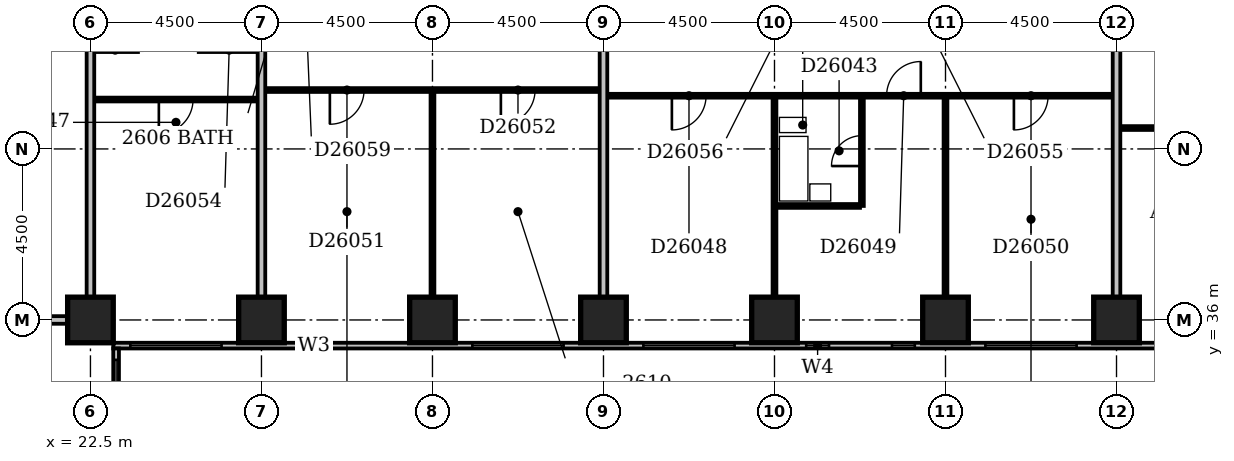
"""IFC4 building model, lengths in metres.
Left out: names, types, materials, properties, quantities, classifications, styles, units other than length and angle.
Written with IfcOpenShell. Run it as: python <this file> out.ifc"""

import sys

from ifc_helpers import new_model, si_unit, direction, frame, frame_2d, origin, origin_2d, place, context, subcontext, project, spatial, rectangle, extrude, element, fill, save


model = new_model("IFC4")
c1 = context("Model", 3, precision=1e-05, world=origin(), true_north=direction((0.0, 1.0)))
c2 = subcontext(c1, "Body", "Model", "MODEL_VIEW")
j1 = project(units=[si_unit("LENGTHUNIT", "METRE"), si_unit("PLANEANGLEUNIT", "RADIAN")], contexts=[c1])
p1 = place(None, origin())
s1 = spatial("IfcSite", under=j1, at=p1, CompositionType="ELEMENT")
p2 = place(p1, origin())
s2 = spatial("IfcBuilding", under=s1, at=p2, CompositionType="ELEMENT")
p3 = place(p2, frame((0.0, 0.0, 104.6)))
s3 = spatial("IfcBuildingStorey", under=s2, at=p3, CompositionType="ELEMENT", Elevation=104.6)
for number, where, z_axis, x_axis in (
    (1, (22.5, 36.0, -0.3), (0.0, 0.0, 1.0), (1.0, 0.0, 0.0)),
    (2, (27.0, 36.0, -0.3), (0.0, 0.0, 1.0), (1.0, 0.0, 0.0)),
    (3, (31.5, 36.0, -0.3), (0.0, 0.0, 1.0), (1.0, 0.0, 0.0)),
    (4, (36.0, 36.0, -0.3), (0.0, 0.0, 1.0), (1.0, 0.0, 0.0)),
    (5, (40.5, 36.0, -0.3), (0.0, 0.0, 1.0), (1.0, 0.0, 0.0)),
    (6, (45.0, 36.0, -0.3), (0.0, 0.0, 1.0), (1.0, 0.0, 0.0)),
    (7, (49.5, 36.0, -0.3), (0.0, 0.0, 1.0), (1.0, 0.0, 0.0)),
):
    element("IfcColumn", number, at=place(p3, frame(where, z_axis=z_axis, x_axis=x_axis)), inside=s3, PredefinedType="COLUMN", context=c2, shape_type="SweptSolid", body=[
        extrude(rectangle(XDim=1.2, YDim=1.2, at=origin_2d()), origin(), (0.0, 0.0, 1.0), 3.45),
    ])
p4 = place(p3, frame((23.175, 17.4, 0.0), z_axis=(0.0, 0.0, 1.0), x_axis=(0.0, 1.0, 0.0)))
e8 = element("IfcWall", 8, at=p4, inside=s3, PredefinedType="STANDARD", context=c2, shape_type="SweptSolid", body=[
    extrude(rectangle(XDim=17.85, YDim=0.15, at=frame_2d((8.925, 0.0))), origin(), (0.0, 0.0, 1.0), 2.5),
])
p5 = place(p4, frame((1.65, 0.0, 0.6)))
e9 = element("IfcOpeningElement", 9, at=p5, cuts=e8, PredefinedType="OPENING", context=c2, shape_type="SweptSolid", body=[
    extrude(rectangle(XDim=2.4, YDim=1.8, at=frame_2d((1.2, 0.9))), frame((0.0, 0.087, 0.0), z_axis=(0.0, -1.0, 0.0), x_axis=(1.0, 0.0, 0.0)), (0.0, 0.0, 1.0), 0.174),
])
p6 = place(p4, frame((5.958, 0.0, 0.6)))
e10 = element("IfcOpeningElement", 10, at=p6, cuts=e8, PredefinedType="OPENING", context=c2, shape_type="SweptSolid", body=[
    extrude(rectangle(XDim=2.1, YDim=1.8, at=frame_2d((1.05, 0.9))), frame((0.0, 0.087, 0.0), z_axis=(0.0, -1.0, 0.0), x_axis=(1.0, 0.0, 0.0)), (0.0, 0.0, 1.0), 0.174),
])
p7 = place(p4, frame((10.65, 0.0, 0.6)))
e11 = element("IfcOpeningElement", 11, at=p7, cuts=e8, PredefinedType="OPENING", context=c2, shape_type="SweptSolid", body=[
    extrude(rectangle(XDim=2.4, YDim=1.8, at=frame_2d((1.2, 0.9))), frame((0.0, 0.087, 0.0), z_axis=(0.0, -1.0, 0.0), x_axis=(1.0, 0.0, 0.0)), (0.0, 0.0, 1.0), 0.174),
])
p8 = place(p4, frame((15.15, 0.0, 0.6)))
e12 = element("IfcOpeningElement", 12, at=p8, cuts=e8, PredefinedType="OPENING", context=c2, shape_type="SweptSolid", body=[
    extrude(rectangle(XDim=2.4, YDim=1.8, at=frame_2d((1.2, 0.9))), frame((0.0, 0.087, 0.0), z_axis=(0.0, -1.0, 0.0), x_axis=(1.0, 0.0, 0.0)), (0.0, 0.0, 1.0), 0.174),
])
p9 = place(p3, frame((23.1, 35.325, 0.0), z_axis=(0.0, 0.0, 1.0), x_axis=(1.0, 0.0, 0.0)))
e13 = element("IfcWall", 13, at=p9, inside=s3, PredefinedType="STANDARD", context=c2, shape_type="SweptSolid", body=[
    extrude(rectangle(XDim=45.15, YDim=0.15, at=frame_2d((22.575, 0.0))), origin(), (0.0, 0.0, 1.0), 2.5),
])
p10 = place(p9, frame((0.45, 0.0, 0.6)))
e14 = element("IfcOpeningElement", 14, at=p10, cuts=e13, PredefinedType="OPENING", context=c2, shape_type="SweptSolid", body=[
    extrude(rectangle(XDim=2.4, YDim=1.8, at=frame_2d((1.2, 0.9))), frame((0.0, 0.087, 0.0), z_axis=(0.0, -1.0, 0.0), x_axis=(1.0, 0.0, 0.0)), (0.0, 0.0, 1.0), 0.174),
])
p11 = place(p9, frame((4.831, 0.0, 0.6)))
e15 = element("IfcOpeningElement", 15, at=p11, cuts=e13, PredefinedType="OPENING", context=c2, shape_type="SweptSolid", body=[
    extrude(rectangle(XDim=0.9, YDim=1.8, at=frame_2d((0.45, 0.9))), frame((0.0, 0.087, 0.0), z_axis=(0.0, -1.0, 0.0), x_axis=(1.0, 0.0, 0.0)), (0.0, 0.0, 1.0), 0.174),
])
p12 = place(p9, frame((9.45, 0.0, 0.6)))
e16 = element("IfcOpeningElement", 16, at=p12, cuts=e13, PredefinedType="OPENING", context=c2, shape_type="SweptSolid", body=[
    extrude(rectangle(XDim=2.4, YDim=1.8, at=frame_2d((1.2, 0.9))), frame((0.0, 0.087, 0.0), z_axis=(0.0, -1.0, 0.0), x_axis=(1.0, 0.0, 0.0)), (0.0, 0.0, 1.0), 0.174),
])
p13 = place(p9, frame((13.95, 0.0, 0.6)))
e17 = element("IfcOpeningElement", 17, at=p13, cuts=e13, PredefinedType="OPENING", context=c2, shape_type="SweptSolid", body=[
    extrude(rectangle(XDim=2.4, YDim=1.8, at=frame_2d((1.2, 0.9))), frame((0.0, 0.087, 0.0), z_axis=(0.0, -1.0, 0.0), x_axis=(1.0, 0.0, 0.0)), (0.0, 0.0, 1.0), 0.174),
])
p14 = place(p9, frame((18.234, 0.0, 0.6)))
e18 = element("IfcOpeningElement", 18, at=p14, cuts=e13, PredefinedType="OPENING", context=c2, shape_type="SweptSolid", body=[
    extrude(rectangle(XDim=0.6, YDim=1.8, at=frame_2d((0.3, 0.9))), frame((0.0, 0.087, 0.0), z_axis=(0.0, -1.0, 0.0), x_axis=(1.0, 0.0, 0.0)), (0.0, 0.0, 1.0), 0.174),
])
p15 = place(p9, frame((20.492, 0.0, 0.6)))
e19 = element("IfcOpeningElement", 19, at=p15, cuts=e13, PredefinedType="OPENING", context=c2, shape_type="SweptSolid", body=[
    extrude(rectangle(XDim=0.6, YDim=1.8, at=frame_2d((0.3, 0.9))), frame((0.0, 0.087, 0.0), z_axis=(0.0, -1.0, 0.0), x_axis=(1.0, 0.0, 0.0)), (0.0, 0.0, 1.0), 0.174),
])
p16 = place(p9, frame((22.95, 0.0, 0.6)))
e20 = element("IfcOpeningElement", 20, at=p16, cuts=e13, PredefinedType="OPENING", context=c2, shape_type="SweptSolid", body=[
    extrude(rectangle(XDim=2.4, YDim=1.8, at=frame_2d((1.2, 0.9))), frame((0.0, 0.087, 0.0), z_axis=(0.0, -1.0, 0.0), x_axis=(1.0, 0.0, 0.0)), (0.0, 0.0, 1.0), 0.174),
])
p17 = place(p9, frame((27.45, 0.0, 0.6)))
e21 = element("IfcOpeningElement", 21, at=p17, cuts=e13, PredefinedType="OPENING", context=c2, shape_type="SweptSolid", body=[
    extrude(rectangle(XDim=2.4, YDim=1.8, at=frame_2d((1.2, 0.9))), frame((0.0, 0.087, 0.0), z_axis=(0.0, -1.0, 0.0), x_axis=(1.0, 0.0, 0.0)), (0.0, 0.0, 1.0), 0.174),
])
p18 = place(p9, frame((31.95, 0.0, 0.6)))
e22 = element("IfcOpeningElement", 22, at=p18, cuts=e13, PredefinedType="OPENING", context=c2, shape_type="SweptSolid", body=[
    extrude(rectangle(XDim=2.4, YDim=1.8, at=frame_2d((1.2, 0.9))), frame((0.0, 0.087, 0.0), z_axis=(0.0, -1.0, 0.0), x_axis=(1.0, 0.0, 0.0)), (0.0, 0.0, 1.0), 0.174),
])
p19 = place(p9, frame((36.45, 0.0, 0.6)))
e23 = element("IfcOpeningElement", 23, at=p19, cuts=e13, PredefinedType="OPENING", context=c2, shape_type="SweptSolid", body=[
    extrude(rectangle(XDim=2.4, YDim=1.8, at=frame_2d((1.2, 0.9))), frame((0.0, 0.087, 0.0), z_axis=(0.0, -1.0, 0.0), x_axis=(1.0, 0.0, 0.0)), (0.0, 0.0, 1.0), 0.174),
])
p20 = place(p9, frame((40.95, 0.0, 0.6)))
e24 = element("IfcOpeningElement", 24, at=p20, cuts=e13, PredefinedType="OPENING", context=c2, shape_type="SweptSolid", body=[
    extrude(rectangle(XDim=2.4, YDim=1.8, at=frame_2d((1.2, 0.9))), frame((0.0, 0.087, 0.0), z_axis=(0.0, -1.0, 0.0), x_axis=(1.0, 0.0, 0.0)), (0.0, 0.0, 1.0), 0.174),
])
p21 = place(p3, frame((9.1, 36.0, 0.0), z_axis=(0.0, 0.0, 1.0), x_axis=(1.0, 0.0, 0.0)))
e25 = element("IfcWall", 25, at=p21, inside=s3, PredefinedType="PARTITIONING", context=c2, shape_type="SweptSolid", body=[
    extrude(rectangle(XDim=12.8, YDim=0.2, at=frame_2d((6.4, 0.0))), origin(), (0.0, 0.0, 1.0), 2.25),
])
p22 = place(p3, frame((22.5, 36.6, 0.0), z_axis=(0.0, 0.0, 1.0), x_axis=(0.0, 1.0, 0.0)))
e26 = element("IfcWall", 26, at=p22, inside=s3, PredefinedType="PARTITIONING", context=c2, shape_type="SweptSolid", body=[
    extrude(rectangle(XDim=12.8, YDim=0.2, at=frame_2d((6.4, 0.0))), origin(), (0.0, 0.0, 1.0), 3.15),
])
p23 = place(p3, frame((27.0, 36.6, 0.0), z_axis=(0.0, 0.0, 1.0), x_axis=(0.0, 1.0, 0.0)))
e27 = element("IfcWall", 27, at=p23, inside=s3, PredefinedType="PARTITIONING", context=c2, shape_type="SweptSolid", body=[
    extrude(rectangle(XDim=12.8, YDim=0.2, at=frame_2d((6.4, 0.0))), origin(), (0.0, 0.0, 1.0), 2.45),
])
p24 = place(p3, frame((31.5, 36.6, 0.0), z_axis=(0.0, 0.0, 1.0), x_axis=(0.0, 1.0, 0.0)))
e28 = element("IfcWall", 28, at=p24, inside=s3, PredefinedType="PARTITIONING", context=c2, shape_type="SweptSolid", body=[
    extrude(rectangle(XDim=5.4, YDim=0.1, at=frame_2d((2.7, 0.0))), origin(), (0.0, 0.0, 1.0), 3.15),
])
p25 = place(p3, frame((36.0, 36.6, 0.0), z_axis=(0.0, 0.0, 1.0), x_axis=(0.0, 1.0, 0.0)))
e29 = element("IfcWall", 29, at=p25, inside=s3, PredefinedType="PARTITIONING", context=c2, shape_type="SweptSolid", body=[
    extrude(rectangle(XDim=12.8, YDim=0.2, at=frame_2d((6.4, 0.0))), origin(), (0.0, 0.0, 1.0), 2.25),
])
p26 = place(p3, frame((40.5, 36.6, 0.0), z_axis=(0.0, 0.0, 1.0), x_axis=(0.0, 1.0, 0.0)))
e30 = element("IfcWall", 30, at=p26, inside=s3, PredefinedType="PARTITIONING", context=c2, shape_type="SweptSolid", body=[
    extrude(rectangle(XDim=5.25, YDim=0.1, at=frame_2d((2.625, 0.0))), origin(), (0.0, 0.0, 1.0), 3.15),
])
p27 = place(p3, frame((45.0, 36.6, 0.0), z_axis=(0.0, 0.0, 1.0), x_axis=(0.0, 1.0, 0.0)))
e31 = element("IfcWall", 31, at=p27, inside=s3, PredefinedType="PARTITIONING", context=c2, shape_type="SweptSolid", body=[
    extrude(rectangle(XDim=5.25, YDim=0.1, at=frame_2d((2.625, 0.0))), origin(), (0.0, 0.0, 1.0), 2.45),
])
p28 = place(p3, frame((49.5, 36.6, 0.0), z_axis=(0.0, 0.0, 1.0), x_axis=(0.0, 1.0, 0.0)))
e32 = element("IfcWall", 32, at=p28, inside=s3, PredefinedType="PARTITIONING", context=c2, shape_type="SweptSolid", body=[
    extrude(rectangle(XDim=12.8, YDim=0.2, at=frame_2d((6.4, 0.0))), origin(), (0.0, 0.0, 1.0), 3.15),
])
p29 = place(p3, frame((40.55, 39.0, 0.0), z_axis=(0.0, 0.0, 1.0), x_axis=(1.0, 0.0, 0.0)))
e33 = element("IfcWall", 33, at=p29, inside=s3, PredefinedType="PLUMBINGWALL", context=c2, shape_type="SweptSolid", body=[
    extrude(rectangle(XDim=2.2, YDim=0.1, at=frame_2d((1.1, 0.0))), origin(), (0.0, 0.0, 1.0), 3.15),
])
p30 = place(p3, frame((42.8, 39.0, 0.0), z_axis=(0.0, 0.0, 1.0), x_axis=(0.0, 1.0, 0.0)))
e34 = element("IfcWall", 34, at=p30, inside=s3, PredefinedType="PLUMBINGWALL", context=c2, shape_type="SweptSolid", body=[
    extrude(rectangle(XDim=2.85, YDim=0.1, at=frame_2d((1.425, 0.0))), origin(), (0.0, 0.0, 1.0), 3.15),
])
p31 = place(p30, frame((1.05, 0.0, 0.0)))
e35 = element("IfcOpeningElement", 35, at=p31, cuts=e34, PredefinedType="OPENING", context=c2, shape_type="SweptSolid", body=[
    extrude(rectangle(XDim=0.8, YDim=2.1, at=frame_2d((0.4, 1.05))), frame((0.0, 0.062, 0.0), z_axis=(0.0, -1.0, 0.0), x_axis=(1.0, 0.0, 0.0)), (0.0, 0.0, 1.0), 0.124),
])
p32 = place(p3, frame((49.6, 41.05, 0.0), z_axis=(0.0, 0.0, 1.0), x_axis=(1.0, 0.0, 0.0)))
e36 = element("IfcWall", 36, at=p32, inside=s3, PredefinedType="PARTITIONING", context=c2, shape_type="SweptSolid", body=[
    extrude(rectangle(XDim=17.3, YDim=0.1, at=frame_2d((8.65, 0.0))), origin(), (0.0, 0.0, 1.0), 3.15),
])
p33 = place(p32, frame((3.9, 0.0, 0.0)))
e37 = element("IfcOpeningElement", 37, at=p33, cuts=e36, PredefinedType="OPENING", context=c2, shape_type="SweptSolid", body=[
    extrude(rectangle(XDim=0.9, YDim=2.1, at=frame_2d((0.45, 1.05))), frame((0.0, 0.062, 0.0), z_axis=(0.0, -1.0, 0.0), x_axis=(1.0, 0.0, 0.0)), (0.0, 0.0, 1.0), 0.124),
])
p34 = place(p32, frame((10.7, 0.0, 0.0)))
e38 = element("IfcOpeningElement", 38, at=p34, cuts=e36, PredefinedType="OPENING", context=c2, shape_type="SweptSolid", body=[
    extrude(rectangle(XDim=0.9, YDim=2.1, at=frame_2d((0.45, 1.05))), frame((0.0, 0.062, 0.0), z_axis=(0.0, -1.0, 0.0), x_axis=(1.0, 0.0, 0.0)), (0.0, 0.0, 1.0), 0.124),
])
p35 = place(p32, frame((16.3, 0.0, 0.0)))
e39 = element("IfcOpeningElement", 39, at=p35, cuts=e36, PredefinedType="OPENING", context=c2, shape_type="SweptSolid", body=[
    extrude(rectangle(XDim=0.9, YDim=2.1, at=frame_2d((0.45, 1.05))), frame((0.0, 0.062, 0.0), z_axis=(0.0, -1.0, 0.0), x_axis=(1.0, 0.0, 0.0)), (0.0, 0.0, 1.0), 0.124),
])
p36 = place(p3, frame((22.6, 41.8, 0.0), z_axis=(0.0, 0.0, 1.0), x_axis=(1.0, 0.0, 0.0)))
e40 = element("IfcWall", 40, at=p36, inside=s3, PredefinedType="PARTITIONING", context=c2, shape_type="SweptSolid", body=[
    extrude(rectangle(XDim=4.3, YDim=0.1, at=frame_2d((2.15, 0.0))), origin(), (0.0, 0.0, 1.0), 3.15),
])
p37 = place(p36, frame((1.7, 0.0, 0.0)))
e41 = element("IfcOpeningElement", 41, at=p37, cuts=e40, PredefinedType="OPENING", context=c2, shape_type="SweptSolid", body=[
    extrude(rectangle(XDim=0.9, YDim=2.1, at=frame_2d((0.45, 1.05))), frame((0.0, 0.062, 0.0), z_axis=(0.0, -1.0, 0.0), x_axis=(1.0, 0.0, 0.0)), (0.0, 0.0, 1.0), 0.124),
])
p38 = place(p3, frame((36.1, 41.9, 0.0), z_axis=(0.0, 0.0, 1.0), x_axis=(1.0, 0.0, 0.0)))
e42 = element("IfcWall", 42, at=p38, inside=s3, PredefinedType="PARTITIONING", context=c2, shape_type="SweptSolid", body=[
    extrude(rectangle(XDim=13.3, YDim=0.1, at=frame_2d((6.65, 0.0))), origin(), (0.0, 0.0, 1.0), 3.15),
])
p39 = place(p38, frame((1.7, 0.0, 0.0)))
e43 = element("IfcOpeningElement", 43, at=p39, cuts=e42, PredefinedType="OPENING", context=c2, shape_type="SweptSolid", body=[
    extrude(rectangle(XDim=0.9, YDim=2.1, at=frame_2d((0.45, 1.05))), frame((0.0, 0.062, 0.0), z_axis=(0.0, -1.0, 0.0), x_axis=(1.0, 0.0, 0.0)), (0.0, 0.0, 1.0), 0.124),
])
p40 = place(p38, frame((7.35, 0.0, 0.0)))
e44 = element("IfcOpeningElement", 44, at=p40, cuts=e42, PredefinedType="OPENING", context=c2, shape_type="SweptSolid", body=[
    extrude(rectangle(XDim=0.9, YDim=2.1, at=frame_2d((0.45, 1.05))), frame((0.0, 0.062, 0.0), z_axis=(0.0, -1.0, 0.0), x_axis=(1.0, 0.0, 0.0)), (0.0, 0.0, 1.0), 0.124),
])
p41 = place(p38, frame((10.7, 0.0, 0.0)))
e45 = element("IfcOpeningElement", 45, at=p41, cuts=e42, PredefinedType="OPENING", context=c2, shape_type="SweptSolid", body=[
    extrude(rectangle(XDim=0.9, YDim=2.1, at=frame_2d((0.45, 1.05))), frame((0.0, 0.062, 0.0), z_axis=(0.0, -1.0, 0.0), x_axis=(1.0, 0.0, 0.0)), (0.0, 0.0, 1.0), 0.124),
])
p42 = place(p3, frame((27.1, 42.05, 0.0), z_axis=(0.0, 0.0, 1.0), x_axis=(1.0, 0.0, 0.0)))
e46 = element("IfcWall", 46, at=p42, inside=s3, PredefinedType="PARTITIONING", context=c2, shape_type="SweptSolid", body=[
    extrude(rectangle(XDim=8.8, YDim=0.1, at=frame_2d((4.4, 0.0))), origin(), (0.0, 0.0, 1.0), 3.15),
])
p43 = place(p42, frame((1.7, 0.0, 0.0)))
e47 = element("IfcOpeningElement", 47, at=p43, cuts=e46, PredefinedType="OPENING", context=c2, shape_type="SweptSolid", body=[
    extrude(rectangle(XDim=0.9, YDim=2.1, at=frame_2d((0.45, 1.05))), frame((0.0, 0.062, 0.0), z_axis=(0.0, -1.0, 0.0), x_axis=(1.0, 0.0, 0.0)), (0.0, 0.0, 1.0), 0.124),
])
p44 = place(p42, frame((6.2, 0.0, 0.0)))
e48 = element("IfcOpeningElement", 48, at=p44, cuts=e46, PredefinedType="OPENING", context=c2, shape_type="SweptSolid", body=[
    extrude(rectangle(XDim=0.9, YDim=2.1, at=frame_2d((0.45, 1.05))), frame((0.0, 0.062, 0.0), z_axis=(0.0, -1.0, 0.0), x_axis=(1.0, 0.0, 0.0)), (0.0, 0.0, 1.0), 0.124),
])
p45 = place(p8, origin())
e49 = element("IfcWindow", 49, at=p45, inside=s3, PartitioningType="SINGLE_PANEL", PredefinedType="WINDOW", context=c2, shape_type="SweptSolid", body=[
    extrude(rectangle(XDim=2.4, YDim=1.8, at=frame_2d((1.2, 0.9))), frame((0.0, 0.03, 0.0), z_axis=(0.0, -1.0, 0.0), x_axis=(1.0, 0.0, 0.0)), (0.0, 0.0, 1.0), 0.06),
])
fill(e12, e49)
p46 = place(p10, origin())
e50 = element("IfcWindow", 50, at=p46, inside=s3, PartitioningType="SINGLE_PANEL", PredefinedType="WINDOW", context=c2, shape_type="SweptSolid", body=[
    extrude(rectangle(XDim=2.4, YDim=1.8, at=frame_2d((1.2, 0.9))), frame((0.0, 0.03, 0.0), z_axis=(0.0, -1.0, 0.0), x_axis=(1.0, 0.0, 0.0)), (0.0, 0.0, 1.0), 0.06),
])
fill(e14, e50)
p47 = place(p11, origin())
e51 = element("IfcWindow", 51, at=p47, inside=s3, PartitioningType="SINGLE_PANEL", PredefinedType="WINDOW", context=c2, shape_type="SweptSolid", body=[
    extrude(rectangle(XDim=0.9, YDim=1.8, at=frame_2d((0.45, 0.9))), frame((0.0, 0.03, 0.0), z_axis=(0.0, -1.0, 0.0), x_axis=(1.0, 0.0, 0.0)), (0.0, 0.0, 1.0), 0.06),
])
fill(e15, e51)
p48 = place(p12, origin())
e52 = element("IfcWindow", 52, at=p48, inside=s3, PartitioningType="SINGLE_PANEL", PredefinedType="WINDOW", context=c2, shape_type="SweptSolid", body=[
    extrude(rectangle(XDim=2.4, YDim=1.8, at=frame_2d((1.2, 0.9))), frame((0.0, 0.03, 0.0), z_axis=(0.0, -1.0, 0.0), x_axis=(1.0, 0.0, 0.0)), (0.0, 0.0, 1.0), 0.06),
])
fill(e16, e52)
p49 = place(p13, origin())
e53 = element("IfcWindow", 53, at=p49, inside=s3, PartitioningType="SINGLE_PANEL", PredefinedType="WINDOW", context=c2, shape_type="SweptSolid", body=[
    extrude(rectangle(XDim=2.4, YDim=1.8, at=frame_2d((1.2, 0.9))), frame((0.0, 0.03, 0.0), z_axis=(0.0, -1.0, 0.0), x_axis=(1.0, 0.0, 0.0)), (0.0, 0.0, 1.0), 0.06),
])
fill(e17, e53)
p50 = place(p14, origin())
e54 = element("IfcWindow", 54, at=p50, inside=s3, PartitioningType="SINGLE_PANEL", PredefinedType="WINDOW", context=c2, shape_type="SweptSolid", body=[
    extrude(rectangle(XDim=0.6, YDim=1.8, at=frame_2d((0.3, 0.9))), frame((0.0, 0.03, 0.0), z_axis=(0.0, -1.0, 0.0), x_axis=(1.0, 0.0, 0.0)), (0.0, 0.0, 1.0), 0.06),
])
fill(e18, e54)
p51 = place(p15, origin())
e55 = element("IfcWindow", 55, at=p51, inside=s3, PartitioningType="SINGLE_PANEL", PredefinedType="WINDOW", context=c2, shape_type="SweptSolid", body=[
    extrude(rectangle(XDim=0.6, YDim=1.8, at=frame_2d((0.3, 0.9))), frame((0.0, 0.03, 0.0), z_axis=(0.0, -1.0, 0.0), x_axis=(1.0, 0.0, 0.0)), (0.0, 0.0, 1.0), 0.06),
])
fill(e19, e55)
p52 = place(p16, origin())
e56 = element("IfcWindow", 56, at=p52, inside=s3, PartitioningType="SINGLE_PANEL", PredefinedType="WINDOW", context=c2, shape_type="SweptSolid", body=[
    extrude(rectangle(XDim=2.4, YDim=1.8, at=frame_2d((1.2, 0.9))), frame((0.0, 0.03, 0.0), z_axis=(0.0, -1.0, 0.0), x_axis=(1.0, 0.0, 0.0)), (0.0, 0.0, 1.0), 0.06),
])
fill(e20, e56)
p53 = place(p31, origin())
e57 = element("IfcDoor", 57, at=p53, inside=s3, OperationType="SINGLE_SWING_LEFT", PredefinedType="DOOR", context=c2, shape_type="SweptSolid", body=[
    extrude(rectangle(XDim=0.8, YDim=2.1, at=frame_2d((0.4, 1.05))), frame((0.0, 0.025, 0.0), z_axis=(0.0, -1.0, 0.0), x_axis=(1.0, 0.0, 0.0)), (0.0, 0.0, 1.0), 0.05),
])
fill(e35, e57)
p54 = place(p37, frame((0.9, 0.0, 0.0), z_axis=(0.0, 0.0, 1.0), x_axis=(-1.0, 0.0, 0.0)))
e58 = element("IfcDoor", 58, at=p54, inside=s3, OperationType="SINGLE_SWING_RIGHT", PredefinedType="DOOR", context=c2, shape_type="SweptSolid", body=[
    extrude(rectangle(XDim=0.9, YDim=2.1, at=frame_2d((0.45, 1.05))), frame((0.0, 0.025, 0.0), z_axis=(0.0, -1.0, 0.0), x_axis=(1.0, 0.0, 0.0)), (0.0, 0.0, 1.0), 0.05),
])
fill(e41, e58)
p55 = place(p39, frame((0.9, 0.0, 0.0), z_axis=(0.0, 0.0, 1.0), x_axis=(-1.0, 0.0, 0.0)))
e59 = element("IfcDoor", 59, at=p55, inside=s3, OperationType="SINGLE_SWING_RIGHT", PredefinedType="DOOR", context=c2, shape_type="SweptSolid", body=[
    extrude(rectangle(XDim=0.9, YDim=2.1, at=frame_2d((0.45, 1.05))), frame((0.0, 0.025, 0.0), z_axis=(0.0, -1.0, 0.0), x_axis=(1.0, 0.0, 0.0)), (0.0, 0.0, 1.0), 0.05),
])
fill(e43, e59)
p56 = place(p40, frame((0.9, 0.0, 0.0), z_axis=(0.0, 0.0, 1.0), x_axis=(-1.0, 0.0, 0.0)))
e60 = element("IfcDoor", 60, at=p56, inside=s3, OperationType="SINGLE_SWING_LEFT", PredefinedType="DOOR", context=c2, shape_type="SweptSolid", body=[
    extrude(rectangle(XDim=0.9, YDim=2.1, at=frame_2d((0.45, 1.05))), frame((0.0, 0.025, 0.0), z_axis=(0.0, -1.0, 0.0), x_axis=(1.0, 0.0, 0.0)), (0.0, 0.0, 1.0), 0.05),
])
fill(e44, e60)
p57 = place(p41, frame((0.9, 0.0, 0.0), z_axis=(0.0, 0.0, 1.0), x_axis=(-1.0, 0.0, 0.0)))
e61 = element("IfcDoor", 61, at=p57, inside=s3, OperationType="SINGLE_SWING_RIGHT", PredefinedType="DOOR", context=c2, shape_type="SweptSolid", body=[
    extrude(rectangle(XDim=0.9, YDim=2.1, at=frame_2d((0.45, 1.05))), frame((0.0, 0.025, 0.0), z_axis=(0.0, -1.0, 0.0), x_axis=(1.0, 0.0, 0.0)), (0.0, 0.0, 1.0), 0.05),
])
fill(e45, e61)
p58 = place(p43, frame((0.9, 0.0, 0.0), z_axis=(0.0, 0.0, 1.0), x_axis=(-1.0, 0.0, 0.0)))
e62 = element("IfcDoor", 62, at=p58, inside=s3, OperationType="SINGLE_SWING_RIGHT", PredefinedType="DOOR", context=c2, shape_type="SweptSolid", body=[
    extrude(rectangle(XDim=0.9, YDim=2.1, at=frame_2d((0.45, 1.05))), frame((0.0, 0.025, 0.0), z_axis=(0.0, -1.0, 0.0), x_axis=(1.0, 0.0, 0.0)), (0.0, 0.0, 1.0), 0.05),
])
fill(e47, e62)
p59 = place(p44, frame((0.9, 0.0, 0.0), z_axis=(0.0, 0.0, 1.0), x_axis=(-1.0, 0.0, 0.0)))
e63 = element("IfcDoor", 63, at=p59, inside=s3, OperationType="SINGLE_SWING_RIGHT", PredefinedType="DOOR", context=c2, shape_type="SweptSolid", body=[
    extrude(rectangle(XDim=0.9, YDim=2.1, at=frame_2d((0.45, 1.05))), frame((0.0, 0.025, 0.0), z_axis=(0.0, -1.0, 0.0), x_axis=(1.0, 0.0, 0.0)), (0.0, 0.0, 1.0), 0.05),
])
fill(e48, e63)
save(model, sys.argv[1])
